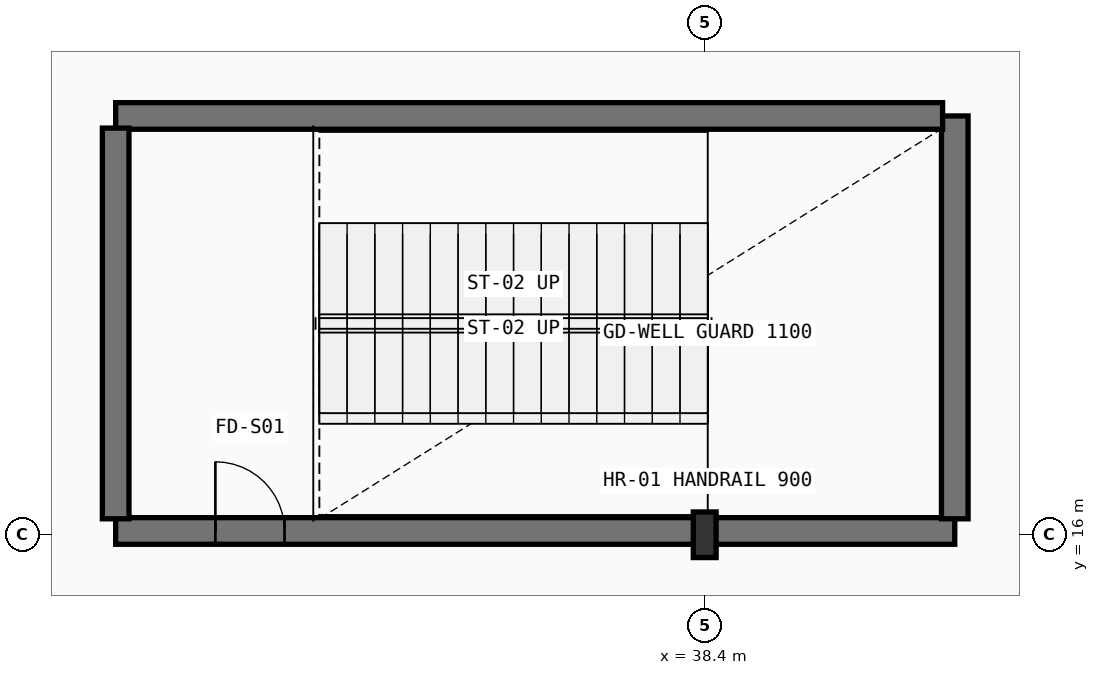
"""IFC4 building model, lengths in metres.
Left out: names, types, materials, properties, quantities, classifications, styles, units other than length and angle.
Written with IfcOpenShell. Run it as: python <this file> out.ifc"""

import sys

from ifc_helpers import new_model, si_unit, direction, frame, frame_2d, origin, origin_2d, place, context, subcontext, project, spatial, rectangle, i_section, extrude, element, fill, save


model = new_model("IFC4")
c1 = context("Model", 3, precision=1e-05, world=origin(), true_north=direction((0.0, 1.0)))
c2 = subcontext(c1, "Body", "Model", "MODEL_VIEW")
j1 = project(units=[si_unit("LENGTHUNIT", "METRE"), si_unit("PLANEANGLEUNIT", "RADIAN")], contexts=[c1])
p1 = place(None, origin())
s1 = spatial("IfcSite", under=j1, at=p1, CompositionType="ELEMENT")
p2 = place(p1, origin())
s2 = spatial("IfcBuilding", under=s1, at=p2, CompositionType="ELEMENT")
p3 = place(p2, frame((0.0, 0.0, 6.0)))
s3 = spatial("IfcBuildingStorey", under=s2, at=p3, CompositionType="ELEMENT", Elevation=6.0)
p4 = place(p3, frame((38.4, 16.0, 0.0), z_axis=(0.0, 0.0, 1.0), x_axis=(1.0, 0.0, 0.0)))
e1 = element("IfcColumn", 1, at=p4, inside=s3, PredefinedType="COLUMN", context=c2, shape_type="SweptSolid", body=[
    extrude(i_section(OverallWidth=0.3, OverallDepth=0.6, WebThickness=0.015, FlangeThickness=0.03, FilletRadius=0.027, at=origin_2d()), origin(), (0.0, 0.0, 1.0), 5.4),
])
p5 = place(p3, frame((30.65, 16.05, 0.0), z_axis=(0.0, 0.0, 1.0), x_axis=(1.0, 0.0, 0.0)))
e2 = element("IfcWall", 2, at=p5, inside=s3, PredefinedType="SHEAR", context=c2, shape_type="SweptSolid", body=[
    extrude(rectangle(XDim=11.04, YDim=0.35, at=frame_2d((5.52, 0.0))), origin(), (0.0, 0.0, 1.0), 5.15),
])
p6 = place(p5, frame((1.312, 0.0, 0.0)))
e3 = element("IfcOpeningElement", 3, at=p6, cuts=e2, PredefinedType="OPENING", context=c2, shape_type="SweptSolid", body=[
    extrude(rectangle(XDim=0.91, YDim=2.08, at=frame_2d((0.455, 1.04))), frame((0.0, 0.185, 0.0), z_axis=(0.0, -1.0, 0.0), x_axis=(1.0, 0.0, 0.0)), (0.0, 0.0, 1.0), 0.37),
])
p7 = place(p3, frame((41.69, 16.21, 0.0), z_axis=(0.0, 0.0, 1.0), x_axis=(0.0, 1.0, 0.0)))
e4 = element("IfcWall", 4, at=p7, inside=s3, PredefinedType="SHEAR", context=c2, shape_type="SweptSolid", body=[
    extrude(rectangle(XDim=5.3, YDim=0.35, at=frame_2d((2.65, 0.0))), origin(), (0.0, 0.0, 1.0), 5.15),
])
p8 = place(p3, frame((41.53, 21.51, 0.0), z_axis=(0.0, 0.0, 1.0), x_axis=(-1.0, 0.0, 0.0)))
e5 = element("IfcWall", 5, at=p8, inside=s3, PredefinedType="SHEAR", context=c2, shape_type="SweptSolid", body=[
    extrude(rectangle(XDim=10.88, YDim=0.35, at=frame_2d((5.44, 0.0))), origin(), (0.0, 0.0, 1.0), 5.15),
])
p9 = place(p3, frame((30.65, 21.35, 0.0), z_axis=(0.0, 0.0, 1.0), x_axis=(0.0, -1.0, 0.0)))
e6 = element("IfcWall", 6, at=p9, inside=s3, PredefinedType="SHEAR", context=c2, shape_type="SweptSolid", body=[
    extrude(rectangle(XDim=5.14, YDim=0.35, at=frame_2d((2.57, 0.0))), origin(), (0.0, 0.0, 1.0), 5.15),
])
p10 = place(p6, origin())
e7 = element("IfcDoor", 7, at=p10, inside=s3, OperationType="SINGLE_SWING_RIGHT", PredefinedType="DOOR", context=c2, shape_type="SweptSolid", body=[
    extrude(rectangle(XDim=0.91, YDim=2.08, at=frame_2d((0.455, 1.04))), frame((0.0, 0.025, 0.0), z_axis=(0.0, -1.0, 0.0), x_axis=(1.0, 0.0, 0.0)), (0.0, 0.0, 1.0), 0.05),
])
fill(e3, e7)
save(model, sys.argv[1])
